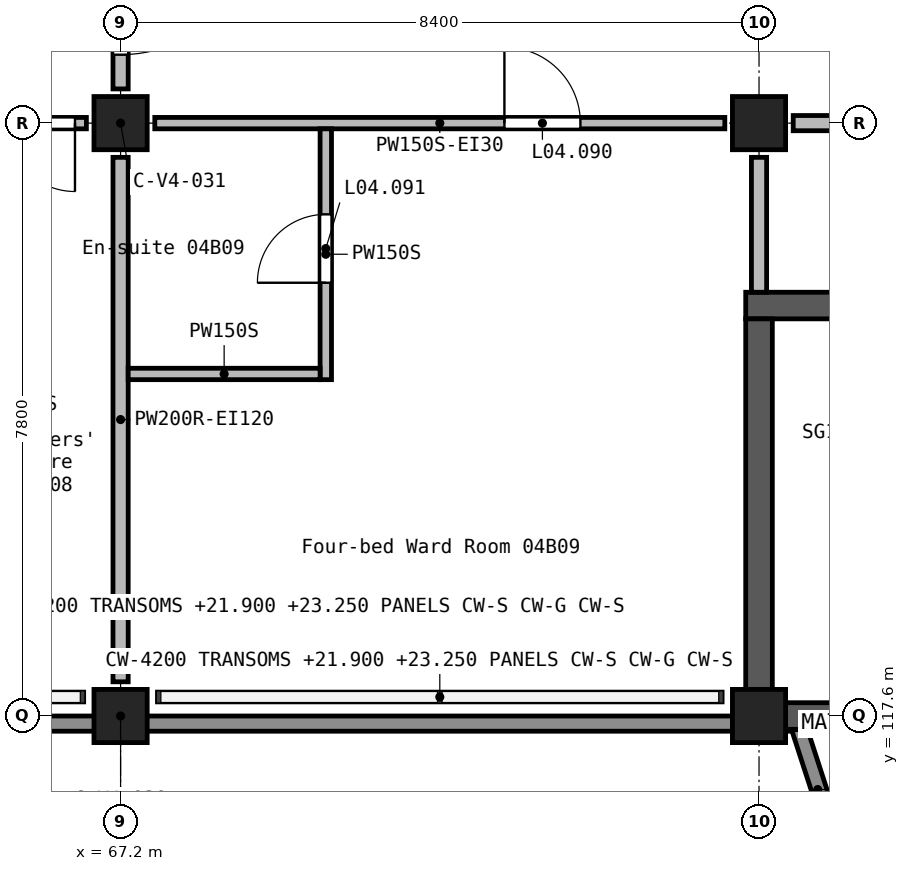
"""IFC4 building model, lengths in metres.
Left out: names, types, materials, properties, quantities, classifications, styles, units other than length and angle.
Written with IfcOpenShell. Run it as: python <this file> out.ifc"""

import sys

from ifc_helpers import new_model, si_unit, direction, frame, frame_2d, origin, origin_2d, place, context, subcontext, project, spatial, polyline, rectangle, outline, extrude, element, fill, save


model = new_model("IFC4")
c1 = context("Model", 3, precision=1e-05, world=origin(), true_north=direction((0.0, 1.0)))
c2 = subcontext(c1, "Body", "Model", "MODEL_VIEW")
j1 = project(units=[si_unit("LENGTHUNIT", "METRE"), si_unit("PLANEANGLEUNIT", "RADIAN")], contexts=[c1])
p1 = place(None, origin())
s1 = spatial("IfcSite", under=j1, at=p1, CompositionType="ELEMENT")
p2 = place(p1, origin())
s2 = spatial("IfcBuilding", under=s1, at=p2, CompositionType="ELEMENT")
p3 = place(p2, frame((0.0, 0.0, 21.0)))
s3 = spatial("IfcBuildingStorey", under=s2, at=p3, CompositionType="ELEMENT", Elevation=21.0)
for number, where, z_axis, x_axis in (
    (1, (67.2, 117.6, 0.0), (0.0, 0.0, 1.0), (1.0, 0.0, 0.0)),
    (2, (67.2, 125.4, 0.0), (0.0, 0.0, 1.0), (1.0, 0.0, 0.0)),
    (3, (75.6, 117.6, 0.0), (0.0, 0.0, 1.0), (1.0, 0.0, 0.0)),
    (4, (75.6, 125.4, 0.0), (0.0, 0.0, 1.0), (1.0, 0.0, 0.0)),
):
    element("IfcColumn", number, at=place(p3, frame(where, z_axis=z_axis, x_axis=x_axis)), inside=s3, PredefinedType="COLUMN", context=c2, shape_type="SweptSolid", body=[
        extrude(rectangle(XDim=0.7, YDim=0.7, at=origin_2d()), origin(), (0.0, 0.0, 1.0), 3.9),
    ])
p4 = place(p3, frame((75.425, 123.0, 0.0), z_axis=(0.0, 0.0, 1.0), x_axis=(1.0, 0.0, 0.0)))
e5 = element("IfcWall", 5, at=p4, inside=s3, PredefinedType="SHEAR", context=c2, shape_type="SweptSolid", body=[
    extrude(rectangle(XDim=8.4, YDim=0.35, at=frame_2d((4.2, 0.0))), origin(), (0.0, 0.0, 1.0), 3.9),
])
p5 = place(p4, frame((6.875, 0.0, 0.0)))
e6 = element("IfcOpeningElement", 6, at=p5, cuts=e5, PredefinedType="OPENING", context=c2, shape_type="SweptSolid", body=[
    extrude(rectangle(XDim=1.1, YDim=2.1, at=frame_2d((0.55, 1.05))), frame((0.0, 0.185, 0.0), z_axis=(0.0, -1.0, 0.0), x_axis=(1.0, 0.0, 0.0)), (0.0, 0.0, 1.0), 0.37),
])
p6 = place(p3, frame((75.6, 117.425, 0.0), z_axis=(0.0, 0.0, 1.0), x_axis=(0.0, 1.0, 0.0)))
e7 = element("IfcWall", 7, at=p6, inside=s3, PredefinedType="SHEAR", context=c2, shape_type="SweptSolid", body=[
    extrude(rectangle(XDim=5.4, YDim=0.35, at=frame_2d((2.7, 0.0))), origin(), (0.0, 0.0, 1.0), 3.9),
])
p7 = place(p3, frame((75.775, 117.6, 0.0), z_axis=(0.0, 0.0, 1.0), x_axis=(1.0, 0.0, 0.0)))
e8 = element("IfcWall", 8, at=p7, inside=s3, PredefinedType="SHEAR", context=c2, shape_type="SweptSolid", body=[
    extrude(rectangle(XDim=8.05, YDim=0.35, at=frame_2d((4.025, 0.0))), origin(), (0.0, 0.0, 1.0), 3.9),
])
p8 = place(p3, origin())
e9 = element("IfcWall", 9, at=p8, inside=s3, PredefinedType="PARAPET", context=c2, shape_type="SweptSolid", body=[
    extrude(outline(polyline([(76.035, 117.4), (76.049, 117.42), (76.239, 117.42), (76.864, 115.493), (76.674, 115.43), (76.035, 117.4)])), origin(), (0.0, 0.0, 1.0), 1.1),
])
p9 = place(p3, origin())
e10 = element("IfcWall", 10, at=p9, inside=s3, PredefinedType="PARAPET", context=c2, shape_type="SweptSolid", body=[
    extrude(outline(polyline([(42.2, 117.4), (42.18, 117.42), (50.575, 117.42), (50.575, 117.42), (50.576, 117.42), (50.576, 117.42), (50.577, 117.42), (50.577, 117.421), (50.578, 117.421), (50.578, 117.421), (50.579, 117.421), (50.579, 117.422), (50.579, 117.422), (50.579, 117.423), (50.58, 117.423), (50.58, 117.424), (50.58, 117.424), (50.58, 117.425), (50.58, 117.425), (50.58, 117.6), (75.42, 117.6), (75.42, 117.425), (75.42, 117.425), (75.42, 117.424), (75.42, 117.424), (75.42, 117.423), (75.421, 117.423), (75.421, 117.422), (75.421, 117.422), (75.421, 117.421), (75.422, 117.421), (75.422, 117.421), (75.423, 117.421), (75.423, 117.42), (75.424, 117.42), (75.424, 117.42), (75.425, 117.42), (75.425, 117.42), (75.775, 117.42), (75.775, 117.42), (76.049, 117.42), (76.035, 117.4), (42.2, 117.4)])), origin(), (0.0, 0.0, 1.0), 1.1),
])
p10 = place(p3, frame((67.2, 128.55, 0.0), z_axis=(0.0, 0.0, 1.0), x_axis=(0.0, -1.0, 0.0)))
e11 = element("IfcWall", 11, at=p10, inside=s3, PredefinedType="SOLIDWALL", context=c2, shape_type="SweptSolid", body=[
    extrude(rectangle(XDim=2.7, YDim=0.2, at=frame_2d((1.35, 0.0))), origin(), (0.0, 0.0, 1.0), 3.6),
])
p11 = place(p10, frame((0.45, 0.0, 0.0)))
e12 = element("IfcOpeningElement", 12, at=p11, cuts=e11, PredefinedType="OPENING", context=c2, shape_type="SweptSolid", body=[
    extrude(rectangle(XDim=1.8, YDim=2.1, at=frame_2d((0.9, 1.05))), frame((0.0, 0.11, 0.0), z_axis=(0.0, -1.0, 0.0), x_axis=(1.0, 0.0, 0.0)), (0.0, 0.0, 1.0), 0.22),
])
p12 = place(p3, frame((67.2, 124.95, 0.0), z_axis=(0.0, 0.0, 1.0), x_axis=(0.0, -1.0, 0.0)))
e13 = element("IfcWall", 13, at=p12, inside=s3, PredefinedType="SOLIDWALL", context=c2, shape_type="SweptSolid", body=[
    extrude(rectangle(XDim=6.9, YDim=0.2, at=frame_2d((3.45, 0.0))), origin(), (0.0, 0.0, 1.0), 3.6),
])
p13 = place(p3, frame((76.05, 125.4, 0.0), z_axis=(0.0, 0.0, 1.0), x_axis=(1.0, 0.0, 0.0)))
e14 = element("IfcWall", 14, at=p13, inside=s3, PredefinedType="SOLIDWALL", context=c2, shape_type="SweptSolid", body=[
    extrude(rectangle(XDim=7.5, YDim=0.2, at=frame_2d((3.75, 0.0))), origin(), (0.0, 0.0, 1.0), 3.6),
])
p14 = place(p13, frame((3.2, 0.0, 0.0)))
e15 = element("IfcOpeningElement", 15, at=p14, cuts=e14, PredefinedType="OPENING", context=c2, shape_type="SweptSolid", body=[
    extrude(rectangle(XDim=1.1, YDim=2.1, at=frame_2d((0.55, 1.05))), frame((0.0, 0.11, 0.0), z_axis=(0.0, -1.0, 0.0), x_axis=(1.0, 0.0, 0.0)), (0.0, 0.0, 1.0), 0.22),
])
p15 = place(p3, frame((75.6, 123.175, 0.0), z_axis=(0.0, 0.0, 1.0), x_axis=(0.0, 1.0, 0.0)))
e16 = element("IfcWall", 16, at=p15, inside=s3, PredefinedType="SOLIDWALL", context=c2, shape_type="SweptSolid", body=[
    extrude(rectangle(XDim=1.775, YDim=0.2, at=frame_2d((0.887, 0.0))), origin(), (0.0, 0.0, 1.0), 3.6),
])
p16 = place(p3, frame((66.75, 125.4, 0.0), z_axis=(0.0, 0.0, 1.0), x_axis=(-1.0, 0.0, 0.0)))
e17 = element("IfcWall", 17, at=p16, inside=s3, PredefinedType="PARTITIONING", context=c2, shape_type="SweptSolid", body=[
    extrude(rectangle(XDim=7.5, YDim=0.15, at=frame_2d((3.75, 0.0))), origin(), (0.0, 0.0, 1.0), 3.6),
])
p17 = place(p16, frame((5.35, 0.0, 0.0)))
e18 = element("IfcOpeningElement", 18, at=p17, cuts=e17, PredefinedType="OPENING", context=c2, shape_type="SweptSolid", body=[
    extrude(rectangle(XDim=1.0, YDim=2.1, at=frame_2d((0.5, 1.05))), frame((0.0, 0.085, 0.0), z_axis=(0.0, -1.0, 0.0), x_axis=(1.0, 0.0, 0.0)), (0.0, 0.0, 1.0), 0.17),
])
p18 = place(p16, frame((2.25, 0.0, 0.0)))
e19 = element("IfcOpeningElement", 19, at=p18, cuts=e17, PredefinedType="OPENING", context=c2, shape_type="SweptSolid", body=[
    extrude(rectangle(XDim=0.9, YDim=2.1, at=frame_2d((0.45, 1.05))), frame((0.0, 0.085, 0.0), z_axis=(0.0, -1.0, 0.0), x_axis=(1.0, 0.0, 0.0)), (0.0, 0.0, 1.0), 0.17),
])
p19 = place(p16, frame((0.15, 0.0, 0.0)))
e20 = element("IfcOpeningElement", 20, at=p19, cuts=e17, PredefinedType="OPENING", context=c2, shape_type="SweptSolid", body=[
    extrude(rectangle(XDim=0.9, YDim=2.1, at=frame_2d((0.45, 1.05))), frame((0.0, 0.085, 0.0), z_axis=(0.0, -1.0, 0.0), x_axis=(1.0, 0.0, 0.0)), (0.0, 0.0, 1.0), 0.17),
])
p20 = place(p3, frame((67.65, 125.4, 0.0), z_axis=(0.0, 0.0, 1.0), x_axis=(1.0, 0.0, 0.0)))
e21 = element("IfcWall", 21, at=p20, inside=s3, PredefinedType="PARTITIONING", context=c2, shape_type="SweptSolid", body=[
    extrude(rectangle(XDim=7.5, YDim=0.15, at=frame_2d((3.75, 0.0))), origin(), (0.0, 0.0, 1.0), 3.6),
])
p21 = place(p20, frame((4.6, 0.0, 0.0)))
e22 = element("IfcOpeningElement", 22, at=p21, cuts=e21, PredefinedType="OPENING", context=c2, shape_type="SweptSolid", body=[
    extrude(rectangle(XDim=1.0, YDim=2.1, at=frame_2d((0.5, 1.05))), frame((0.0, 0.085, 0.0), z_axis=(0.0, -1.0, 0.0), x_axis=(1.0, 0.0, 0.0)), (0.0, 0.0, 1.0), 0.17),
])
p22 = place(p3, frame((69.9, 122.025, 0.0), z_axis=(0.0, 0.0, 1.0), x_axis=(0.0, 1.0, 0.0)))
e23 = element("IfcWall", 23, at=p22, inside=s3, PredefinedType="PARTITIONING", context=c2, shape_type="SweptSolid", body=[
    extrude(rectangle(XDim=3.3, YDim=0.15, at=frame_2d((1.65, 0.0))), origin(), (0.0, 0.0, 1.0), 3.6),
])
p23 = place(p22, frame((1.275, 0.0, 0.0)))
e24 = element("IfcOpeningElement", 24, at=p23, cuts=e23, PredefinedType="OPENING", context=c2, shape_type="SweptSolid", body=[
    extrude(rectangle(XDim=0.9, YDim=2.1, at=frame_2d((0.45, 1.05))), frame((0.0, 0.085, 0.0), z_axis=(0.0, -1.0, 0.0), x_axis=(1.0, 0.0, 0.0)), (0.0, 0.0, 1.0), 0.17),
])
p24 = place(p3, frame((67.3, 122.1, 0.0), z_axis=(0.0, 0.0, 1.0), x_axis=(1.0, 0.0, 0.0)))
e25 = element("IfcWall", 25, at=p24, inside=s3, PredefinedType="PARTITIONING", context=c2, shape_type="SweptSolid", body=[
    extrude(rectangle(XDim=2.525, YDim=0.15, at=frame_2d((1.262, 0.0))), origin(), (0.0, 0.0, 1.0), 3.6),
])
p25 = place(p11, origin())
e26 = element("IfcDoor", 26, at=p25, inside=s3, OperationType="DOUBLE_DOOR_SINGLE_SWING", PredefinedType="DOOR", context=c2, shape_type="SweptSolid", body=[
    extrude(rectangle(XDim=1.8, YDim=2.1, at=frame_2d((0.9, 1.05))), frame((0.0, 0.025, 0.0), z_axis=(0.0, -1.0, 0.0), x_axis=(1.0, 0.0, 0.0)), (0.0, 0.0, 1.0), 0.05),
])
fill(e12, e26)
p26 = place(p19, origin())
e27 = element("IfcDoor", 27, at=p26, inside=s3, OperationType="SINGLE_SWING_LEFT", PredefinedType="DOOR", context=c2, shape_type="SweptSolid", body=[
    extrude(rectangle(XDim=0.9, YDim=2.1, at=frame_2d((0.45, 1.05))), frame((0.0, 0.025, 0.0), z_axis=(0.0, -1.0, 0.0), x_axis=(1.0, 0.0, 0.0)), (0.0, 0.0, 1.0), 0.05),
])
fill(e20, e27)
p27 = place(p21, frame((1.0, 0.0, 0.0), z_axis=(0.0, 0.0, 1.0), x_axis=(-1.0, 0.0, 0.0)))
e28 = element("IfcDoor", 28, at=p27, inside=s3, OperationType="SINGLE_SWING_LEFT", PredefinedType="DOOR", context=c2, shape_type="SweptSolid", body=[
    extrude(rectangle(XDim=1.0, YDim=2.1, at=frame_2d((0.5, 1.05))), frame((0.0, 0.025, 0.0), z_axis=(0.0, -1.0, 0.0), x_axis=(1.0, 0.0, 0.0)), (0.0, 0.0, 1.0), 0.05),
])
fill(e22, e28)
p28 = place(p23, origin())
e29 = element("IfcDoor", 29, at=p28, inside=s3, OperationType="SINGLE_SWING_RIGHT", PredefinedType="DOOR", context=c2, shape_type="SweptSolid", body=[
    extrude(rectangle(XDim=0.9, YDim=2.1, at=frame_2d((0.45, 1.05))), frame((0.0, 0.025, 0.0), z_axis=(0.0, -1.0, 0.0), x_axis=(1.0, 0.0, 0.0)), (0.0, 0.0, 1.0), 0.05),
])
fill(e24, e29)
save(model, sys.argv[1])
